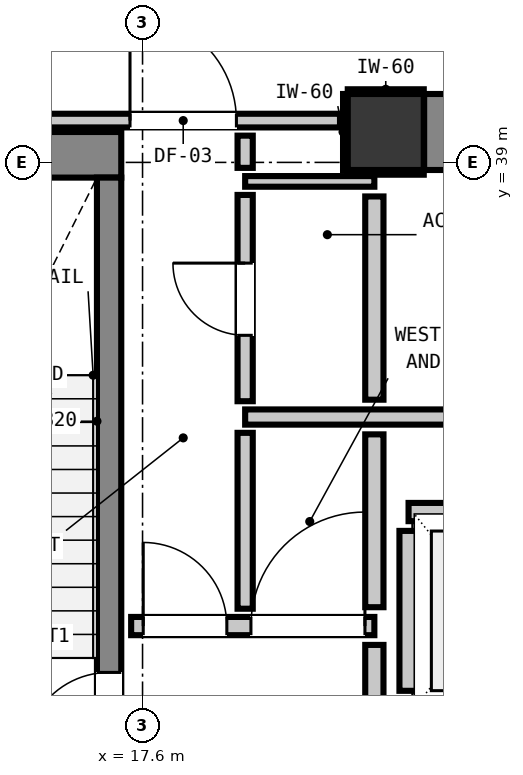
"""IFC4 building model, lengths in metres.
Left out: names, types, materials, properties, quantities, classifications, styles, units other than length and angle.
Written with IfcOpenShell. Run it as: python <this file> out.ifc"""

import sys

from ifc_helpers import new_model, si_unit, direction, frame, frame_2d, origin, origin_2d, place, context, subcontext, project, spatial, rectangle, extrude, element, fill, save


model = new_model("IFC4")
c1 = context("Model", 3, precision=1e-05, world=origin(), true_north=direction((0.0, 1.0)))
c2 = subcontext(c1, "Body", "Model", "MODEL_VIEW")
j1 = project(units=[si_unit("LENGTHUNIT", "METRE"), si_unit("PLANEANGLEUNIT", "RADIAN")], contexts=[c1])
p1 = place(None, origin())
s1 = spatial("IfcSite", under=j1, at=p1, CompositionType="ELEMENT")
p2 = place(p1, origin())
s2 = spatial("IfcBuilding", under=s1, at=p2, CompositionType="ELEMENT")
p3 = place(p2, frame((0.0, 0.0, 88.4)))
s3 = spatial("IfcBuildingStorey", under=s2, at=p3, CompositionType="ELEMENT", Elevation=88.4)
p4 = place(p3, frame((20.8, 39.4, 0.0), z_axis=(0.0, 0.0, 1.0), x_axis=(1.0, 0.0, 0.0)))
e1 = element("IfcColumn", 1, at=p4, inside=s3, PredefinedType="COLUMN", context=c2, shape_type="SweptSolid", body=[
    extrude(rectangle(XDim=1.0, YDim=1.0, at=origin_2d()), origin(), (0.0, 0.0, 1.0), 4.4),
])
p5 = place(p3, frame((13.24, 39.1, 0.0), z_axis=(0.0, 0.0, 1.0), x_axis=(1.0, 0.0, 0.0)))
e2 = element("IfcWall", 2, at=p5, inside=s3, PredefinedType="SHEAR", context=c2, shape_type="SweptSolid", body=[
    extrude(rectangle(XDim=4.08, YDim=0.6, at=frame_2d((2.04, 0.0))), origin(), (0.0, 0.0, 1.0), 4.4),
])
p6 = place(p3, frame((21.305, 39.4, 0.0), z_axis=(0.0, 0.0, 1.0), x_axis=(1.0, 0.0, 0.0)))
e3 = element("IfcWall", 3, at=p6, inside=s3, PredefinedType="SHEAR", context=c2, shape_type="SweptSolid", body=[
    extrude(rectangle(XDim=7.39, YDim=1.0, at=frame_2d((3.695, 0.0))), origin(), (0.0, 0.0, 1.0), 4.4),
])
p7 = place(p3, frame((17.16, 31.0, 0.0), z_axis=(0.0, 0.0, 1.0), x_axis=(0.0, 1.0, 0.0)))
e4 = element("IfcWall", 4, at=p7, inside=s3, PredefinedType="SHEAR", context=c2, shape_type="SweptSolid", body=[
    extrude(rectangle(XDim=7.8, YDim=0.32, at=frame_2d((3.9, 0.0))), origin(), (0.0, 0.0, 1.0), 4.4),
])
p8 = place(p7, frame((0.19, 0.0, 0.0)))
e5 = element("IfcOpeningElement", 5, at=p8, cuts=e4, PredefinedType="OPENING", context=c2, shape_type="SweptSolid", body=[
    extrude(rectangle(XDim=1.1, YDim=2.15, at=frame_2d((0.55, 1.075))), frame((0.0, 0.17, 0.0), z_axis=(0.0, -1.0, 0.0), x_axis=(1.0, 0.0, 0.0)), (0.0, 0.0, 1.0), 0.34),
])
p9 = place(p3, frame((21.1, 34.4, 0.0), z_axis=(0.0, 0.0, 1.0), x_axis=(1.0, 0.0, 0.0)))
e6 = element("IfcWall", 6, at=p9, inside=s3, PredefinedType="PARTITIONING", context=c2, shape_type="SweptSolid", body=[
    extrude(rectangle(XDim=2.2, YDim=0.24, at=frame_2d((1.1, 0.0))), origin(), (0.0, 0.0, 1.0), 4.14),
])
p10 = place(p3, frame((21.1, 32.048, 0.0), z_axis=(0.0, 0.0, 1.0), x_axis=(0.0, 1.0, 0.0)))
e7 = element("IfcWall", 7, at=p10, inside=s3, PredefinedType="PARTITIONING", context=c2, shape_type="SweptSolid", body=[
    extrude(rectangle(XDim=2.104, YDim=0.24, at=frame_2d((1.052, 0.0))), origin(), (0.0, 0.0, 1.0), 3.375),
])
p11 = place(p3, frame((17.45, 32.9, 0.0), z_axis=(0.0, 0.0, 1.0), x_axis=(1.0, 0.0, 0.0)))
e8 = element("IfcWall", 8, at=p11, inside=s3, PredefinedType="PARTITIONING", context=c2, shape_type="SweptSolid", body=[
    extrude(rectangle(XDim=3.2, YDim=0.24, at=frame_2d((1.6, 0.0))), origin(), (0.0, 0.0, 1.0), 4.14),
])
p12 = place(p11, frame((0.159, 0.0, 0.0)))
e9 = element("IfcOpeningElement", 9, at=p12, cuts=e8, PredefinedType="OPENING", context=c2, shape_type="SweptSolid", body=[
    extrude(rectangle(XDim=1.1, YDim=2.15, at=frame_2d((0.55, 1.075))), frame((0.0, 0.13, 0.0), z_axis=(0.0, -1.0, 0.0), x_axis=(1.0, 0.0, 0.0)), (0.0, 0.0, 1.0), 0.26),
])
p13 = place(p11, frame((1.576, 0.0, 0.0)))
e10 = element("IfcOpeningElement", 10, at=p13, cuts=e8, PredefinedType="OPENING", context=c2, shape_type="SweptSolid", body=[
    extrude(rectangle(XDim=1.5, YDim=2.15, at=frame_2d((0.75, 1.075))), frame((0.0, 0.13, 0.0), z_axis=(0.0, -1.0, 0.0), x_axis=(1.0, 0.0, 0.0)), (0.0, 0.0, 1.0), 0.26),
])
p14 = place(p3, frame((18.95, 35.65, 0.0), z_axis=(0.0, 0.0, 1.0), x_axis=(1.0, 0.0, 0.0)))
e11 = element("IfcWall", 11, at=p14, inside=s3, PredefinedType="PARTITIONING", context=c2, shape_type="SweptSolid", body=[
    extrude(rectangle(XDim=11.025, YDim=0.2, at=frame_2d((5.513, 0.0))), origin(), (0.0, 0.0, 1.0), 4.14),
])
p15 = place(p3, frame((10.8, 39.55, 0.0), z_axis=(0.0, 0.0, 1.0), x_axis=(1.0, 0.0, 0.0)))
e12 = element("IfcWall", 12, at=p15, inside=s3, PredefinedType="PARTITIONING", context=c2, shape_type="SweptSolid", body=[
    extrude(rectangle(XDim=9.398, YDim=0.18, at=frame_2d((4.699, 0.0))), origin(), (0.0, 0.0, 1.0), 3.878),
])
p16 = place(p15, frame((6.635, 0.0, 0.0)))
e13 = element("IfcOpeningElement", 13, at=p16, cuts=e12, PredefinedType="OPENING", context=c2, shape_type="SweptSolid", body=[
    extrude(rectangle(XDim=1.4, YDim=2.15, at=frame_2d((0.7, 1.075))), frame((0.0, 0.1, 0.0), z_axis=(0.0, -1.0, 0.0), x_axis=(1.0, 0.0, 0.0)), (0.0, 0.0, 1.0), 0.2),
])
p17 = place(p15, frame((0.199, 0.0, 0.0)))
e14 = element("IfcOpeningElement", 14, at=p17, cuts=e12, PredefinedType="OPENING", context=c2, shape_type="SweptSolid", body=[
    extrude(rectangle(XDim=1.4, YDim=2.15, at=frame_2d((0.7, 1.075))), frame((0.0, 0.1, 0.0), z_axis=(0.0, -1.0, 0.0), x_axis=(1.0, 0.0, 0.0)), (0.0, 0.0, 1.0), 0.2),
])
p18 = place(p3, frame((18.95, 38.75, 0.0), z_axis=(0.0, 0.0, 1.0), x_axis=(1.0, 0.0, 0.0)))
e15 = element("IfcWall", 15, at=p18, inside=s3, PredefinedType="PARTITIONING", context=c2, shape_type="SweptSolid", body=[
    extrude(rectangle(XDim=1.7, YDim=0.14, at=frame_2d((0.85, 0.0))), origin(), (0.0, 0.0, 1.0), 4.14),
])
p19 = place(p3, frame((20.65, 31.332, 0.0), z_axis=(0.0, 0.0, 1.0), x_axis=(0.0, 1.0, 0.0)))
e16 = element("IfcWall", 16, at=p19, inside=s3, PredefinedType="PARTITIONING", context=c2, shape_type="SweptSolid", body=[
    extrude(rectangle(XDim=1.32, YDim=0.24, at=frame_2d((0.66, 0.0))), origin(), (0.0, 0.0, 1.0), 3.375),
])
p20 = place(p3, frame((20.65, 33.148, 0.0), z_axis=(0.0, 0.0, 1.0), x_axis=(0.0, 1.0, 0.0)))
e17 = element("IfcWall", 17, at=p20, inside=s3, PredefinedType="PARTITIONING", context=c2, shape_type="SweptSolid", body=[
    extrude(rectangle(XDim=2.274, YDim=0.24, at=frame_2d((1.137, 0.0))), origin(), (0.0, 0.0, 1.0), 3.375),
])
p21 = place(p3, frame((20.65, 35.878, 0.0), z_axis=(0.0, 0.0, 1.0), x_axis=(0.0, 1.0, 0.0)))
e18 = element("IfcWall", 18, at=p21, inside=s3, PredefinedType="PARTITIONING", context=c2, shape_type="SweptSolid", body=[
    extrude(rectangle(XDim=2.674, YDim=0.24, at=frame_2d((1.337, 0.0))), origin(), (0.0, 0.0, 1.0), 3.375),
])
p22 = place(p3, frame((18.95, 33.128, 0.0), z_axis=(0.0, 0.0, 1.0), x_axis=(0.0, 1.0, 0.0)))
e19 = element("IfcWall", 19, at=p22, inside=s3, PredefinedType="PARTITIONING", context=c2, shape_type="SweptSolid", body=[
    extrude(rectangle(XDim=2.314, YDim=0.2, at=frame_2d((1.157, 0.0))), origin(), (0.0, 0.0, 1.0), 4.14),
])
p23 = place(p3, frame((18.95, 35.858, 0.0), z_axis=(0.0, 0.0, 1.0), x_axis=(0.0, 1.0, 0.0)))
e20 = element("IfcWall", 20, at=p23, inside=s3, PredefinedType="PARTITIONING", context=c2, shape_type="SweptSolid", body=[
    extrude(rectangle(XDim=2.714, YDim=0.2, at=frame_2d((1.357, 0.0))), origin(), (0.0, 0.0, 1.0), 4.14),
])
p24 = place(p23, frame((0.867, 0.0, 0.0)))
e21 = element("IfcOpeningElement", 21, at=p24, cuts=e20, PredefinedType="OPENING", context=c2, shape_type="SweptSolid", body=[
    extrude(rectangle(XDim=0.95, YDim=2.1, at=frame_2d((0.475, 1.05))), frame((0.0, 0.11, 0.0), z_axis=(0.0, -1.0, 0.0), x_axis=(1.0, 0.0, 0.0)), (0.0, 0.0, 1.0), 0.22),
])
p25 = place(p3, frame((18.95, 38.928, 0.0), z_axis=(0.0, 0.0, 1.0), x_axis=(0.0, 1.0, 0.0)))
e22 = element("IfcWall", 22, at=p25, inside=s3, PredefinedType="PARTITIONING", context=c2, shape_type="SweptSolid", body=[
    extrude(rectangle(XDim=0.424, YDim=0.2, at=frame_2d((0.212, 0.0))), origin(), (0.0, 0.0, 1.0), 4.14),
])
for number, where, z_axis, x_axis in (
    (23, (20.3, 38.868, 0.0), (0.0, 0.0, 1.0), (1.0, 0.0, 0.0)),
    (24, (20.3, 39.932, 0.0), (0.0, 0.0, 1.0), (1.0, 0.0, 0.0)),
    (25, (20.268, 38.9, 0.0), (0.0, 0.0, 1.0), (0.0, 1.0, 0.0)),
):
    element("IfcWall", number, at=place(p3, frame(where, z_axis=z_axis, x_axis=x_axis)), inside=s3, PredefinedType="PARTITIONING", context=c2, shape_type="SweptSolid", body=[
        extrude(rectangle(XDim=1.0, YDim=0.06, at=frame_2d((0.5, 0.0))), origin(), (0.0, 0.0, 1.0), 1.45),
    ])
p26 = place(p8, origin())
e26 = element("IfcDoor", 26, at=p26, inside=s3, OperationType="SINGLE_SWING_LEFT", PredefinedType="DOOR", context=c2, shape_type="SweptSolid", body=[
    extrude(rectangle(XDim=1.1, YDim=2.15, at=frame_2d((0.55, 1.075))), frame((0.0, 0.025, 0.0), z_axis=(0.0, -1.0, 0.0), x_axis=(1.0, 0.0, 0.0)), (0.0, 0.0, 1.0), 0.05),
])
fill(e5, e26)
p27 = place(p12, origin())
e27 = element("IfcDoor", 27, at=p27, inside=s3, OperationType="SINGLE_SWING_LEFT", PredefinedType="DOOR", context=c2, shape_type="SweptSolid", body=[
    extrude(rectangle(XDim=1.1, YDim=2.15, at=frame_2d((0.55, 1.075))), frame((0.0, 0.025, 0.0), z_axis=(0.0, -1.0, 0.0), x_axis=(1.0, 0.0, 0.0)), (0.0, 0.0, 1.0), 0.05),
])
fill(e9, e27)
p28 = place(p16, origin())
e28 = element("IfcDoor", 28, at=p28, inside=s3, OperationType="SINGLE_SWING_LEFT", PredefinedType="DOOR", context=c2, shape_type="SweptSolid", body=[
    extrude(rectangle(XDim=1.4, YDim=2.15, at=frame_2d((0.7, 1.075))), frame((0.0, 0.025, 0.0), z_axis=(0.0, -1.0, 0.0), x_axis=(1.0, 0.0, 0.0)), (0.0, 0.0, 1.0), 0.05),
])
fill(e13, e28)
p29 = place(p13, origin())
e29 = element("IfcDoor", 29, at=p29, inside=s3, OperationType="SINGLE_SWING_RIGHT", PredefinedType="DOOR", context=c2, shape_type="SweptSolid", body=[
    extrude(rectangle(XDim=1.5, YDim=2.15, at=frame_2d((0.75, 1.075))), frame((0.0, 0.025, 0.0), z_axis=(0.0, -1.0, 0.0), x_axis=(1.0, 0.0, 0.0)), (0.0, 0.0, 1.0), 0.05),
])
fill(e10, e29)
p30 = place(p24, origin())
e30 = element("IfcDoor", 30, at=p30, inside=s3, OperationType="SINGLE_SWING_RIGHT", PredefinedType="DOOR", context=c2, shape_type="SweptSolid", body=[
    extrude(rectangle(XDim=0.95, YDim=2.1, at=frame_2d((0.475, 1.05))), frame((0.0, 0.025, 0.0), z_axis=(0.0, -1.0, 0.0), x_axis=(1.0, 0.0, 0.0)), (0.0, 0.0, 1.0), 0.05),
])
fill(e21, e30)
save(model, sys.argv[1])
